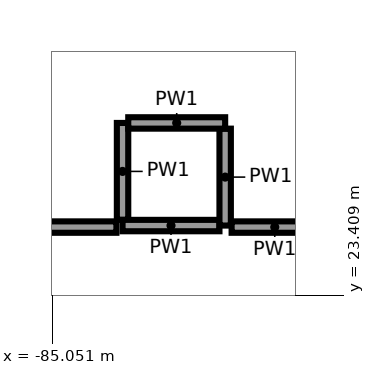
"""IFC4 building model, lengths in metres.
Left out: names, types, materials, properties, quantities, classifications, styles, units other than length and angle.
Written with IfcOpenShell. Run it as: python <this file> out.ifc"""

import sys

from ifc_helpers import new_model, si_unit, direction, frame, frame_2d, origin, place, context, subcontext, project, spatial, rectangle, extrude, element, save


model = new_model("IFC4")
c1 = context("Model", 3, precision=1e-05, world=origin(), true_north=direction((0.0, 1.0)))
c2 = subcontext(c1, "Body", "Model", "MODEL_VIEW")
j1 = project(units=[si_unit("LENGTHUNIT", "METRE"), si_unit("PLANEANGLEUNIT", "RADIAN")], contexts=[c1])
p1 = place(None, origin())
s1 = spatial("IfcSite", under=j1, at=p1, CompositionType="ELEMENT")
p2 = place(p1, origin())
s2 = spatial("IfcBuilding", under=s1, at=p2, CompositionType="ELEMENT")
p3 = place(p2, frame((0.0, 0.0, 18.0)))
s3 = spatial("IfcBuildingStorey", under=s2, at=p3, CompositionType="ELEMENT", Elevation=18.0)
p4 = place(p3, frame((-84.125, 25.675, 0.0), z_axis=(0.0, 0.0, 1.0), x_axis=(0.0, -1.0, 0.0)))
e1 = element("IfcWall", 1, at=p4, inside=s3, PredefinedType="PARTITIONING", context=c2, shape_type="SweptSolid", body=[
    extrude(rectangle(XDim=1.275, YDim=0.15, at=frame_2d((0.638, 0.0))), origin(), (0.0, 0.0, 1.0), 5.6),
])
p5 = place(p3, frame((-84.125, 24.325, 0.0), z_axis=(0.0, 0.0, 1.0), x_axis=(1.0, 0.0, 0.0)))
e2 = element("IfcWall", 2, at=p5, inside=s3, PredefinedType="PARTITIONING", context=c2, shape_type="SweptSolid", body=[
    extrude(rectangle(XDim=1.275, YDim=0.15, at=frame_2d((0.637, 0.0))), origin(), (0.0, 0.0, 1.0), 5.6),
])
for number, where, z_axis, x_axis in (
    (3, (-82.775, 24.325, 0.0), (0.0, 0.0, 1.0), (0.0, 1.0, 0.0)),
    (4, (-82.775, 25.675, 0.0), (0.0, 0.0, 1.0), (-1.0, 0.0, 0.0)),
):
    element("IfcWall", number, at=place(p3, frame(where, z_axis=z_axis, x_axis=x_axis)), inside=s3, PredefinedType="PARTITIONING", context=c2, shape_type="SweptSolid", body=[
        extrude(rectangle(XDim=1.275, YDim=0.15, at=frame_2d((0.638, 0.0))), origin(), (0.0, 0.0, 1.0), 5.6),
    ])
p6 = place(p3, frame((-87.909, 24.305, 0.0), z_axis=(0.0, 0.0, 1.0), x_axis=(1.0, 0.0, 0.0)))
e5 = element("IfcWall", 5, at=p6, inside=s3, PredefinedType="PARTITIONING", context=c2, shape_type="SweptSolid", body=[
    extrude(rectangle(XDim=3.704, YDim=0.15, at=frame_2d((1.852, 0.0))), origin(), (0.0, 0.0, 1.0), 4.5),
])
p7 = place(p6, frame((0.65, 0.0, 0.0)))
e6 = element("IfcOpeningElement", 6, at=p7, cuts=e5, PredefinedType="OPENING", context=c2, shape_type="SweptSolid", body=[
    extrude(rectangle(XDim=1.8, YDim=2.1, at=frame_2d((0.9, 1.05))), frame((0.0, 0.085, 0.0), z_axis=(0.0, -1.0, 0.0), x_axis=(1.0, 0.0, 0.0)), (0.0, 0.0, 1.0), 0.17),
])
p8 = place(p3, frame((-82.69, 24.305, 0.0), z_axis=(0.0, 0.0, 1.0), x_axis=(1.0, 0.0, 0.0)))
e7 = element("IfcWall", 7, at=p8, inside=s3, PredefinedType="PARTITIONING", context=c2, shape_type="SweptSolid", body=[
    extrude(rectangle(XDim=1.135, YDim=0.15, at=frame_2d((0.567, 0.0))), origin(), (0.0, 0.0, 1.0), 5.6),
])
save(model, sys.argv[1])
